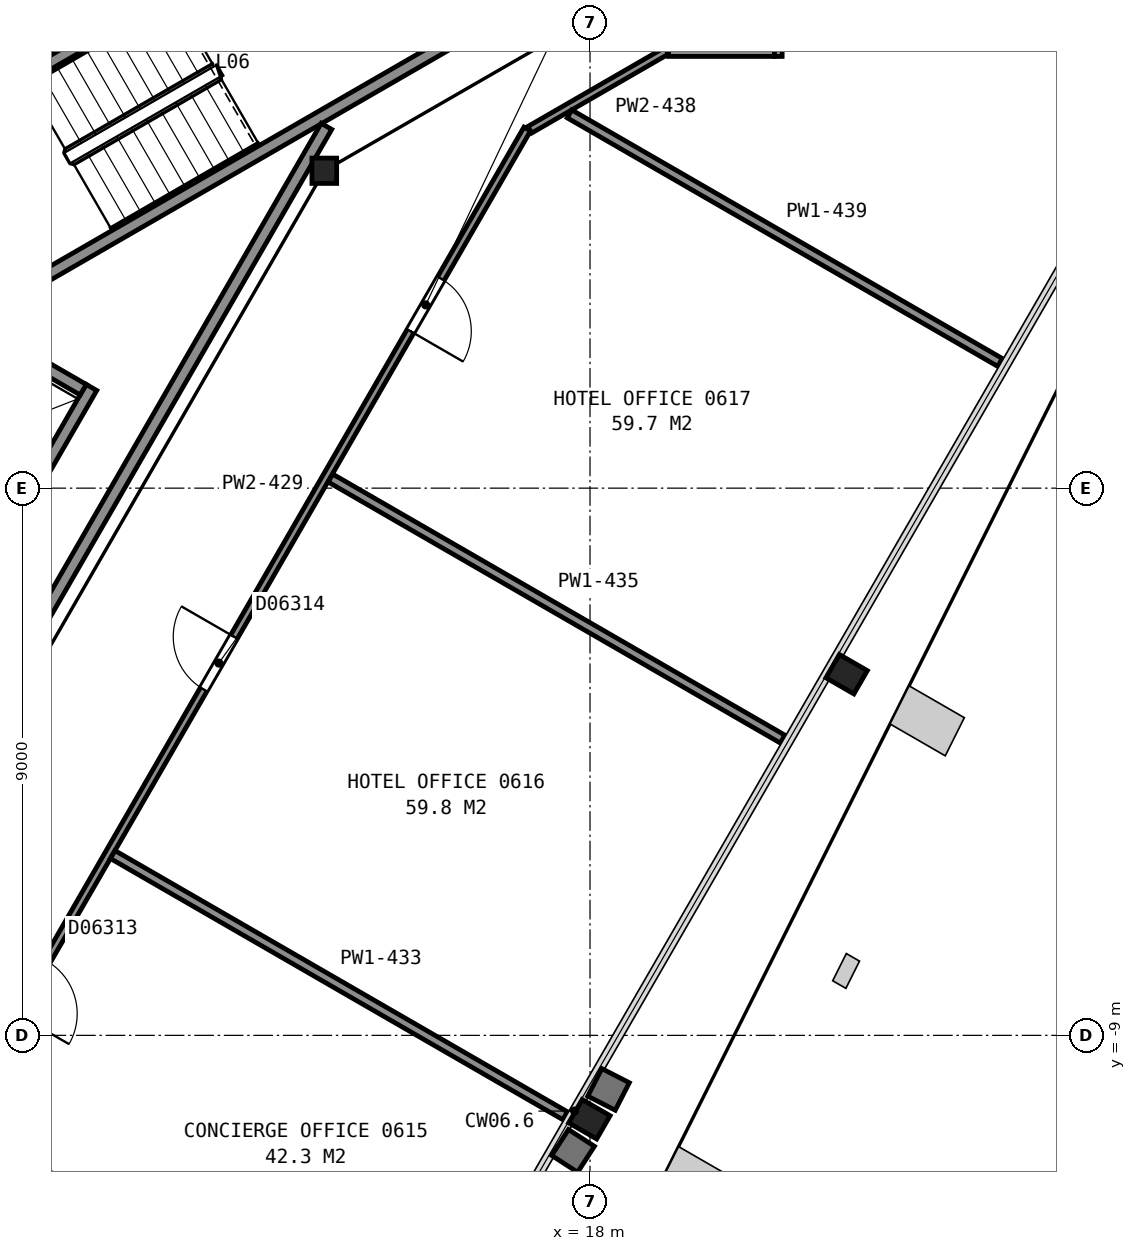
"""IFC4 building model, lengths in metres.
Left out: names, types, materials, properties, quantities, classifications, styles, units other than length and angle.
Written with IfcOpenShell. Run it as: python <this file> out.ifc"""

import sys

from ifc_helpers import new_model, si_unit, direction, frame, frame_2d, origin, origin_2d, place, context, subcontext, project, spatial, rectangle, i_section, extrude, element, fill, save


model = new_model("IFC4")
c1 = context("Model", 3, precision=1e-05, world=origin(), true_north=direction((0.0, 1.0)))
c2 = subcontext(c1, "Body", "Model", "MODEL_VIEW")
j1 = project(units=[si_unit("LENGTHUNIT", "METRE"), si_unit("PLANEANGLEUNIT", "RADIAN")], contexts=[c1])
p1 = place(None, origin())
s1 = spatial("IfcSite", under=j1, at=p1, CompositionType="ELEMENT")
p2 = place(p1, origin())
s2 = spatial("IfcBuilding", under=s1, at=p2, CompositionType="ELEMENT")
p3 = place(p2, frame((0.0, 0.0, 36.8)))
s3 = spatial("IfcBuildingStorey", under=s2, at=p3, CompositionType="ELEMENT", Elevation=36.8)
for number, where, z_axis, x_axis in (
    (1, (17.99, -10.38, 0.025), (0.0, 0.0, 1.0), (-0.5, -0.866, 0.0)),
    (2, (22.22, -3.06, 0.025), (0.0, 0.0, 1.0), (-0.5, -0.866, 0.0)),
):
    element("IfcColumn", number, at=place(p3, frame(where, z_axis=z_axis, x_axis=x_axis)), inside=s3, PredefinedType="COLUMN", context=c2, shape_type="SweptSolid", body=[
        extrude(i_section(OverallWidth=0.442, OverallDepth=0.531, WebThickness=0.066, FlangeThickness=0.106, FilletRadius=0.015, at=origin_2d()), origin(), (0.0, 0.0, 1.0), 3.575),
    ])
p4 = place(p3, frame((13.63, 5.22, 0.0), z_axis=(0.0, 0.0, 1.0), x_axis=(1.0, 0.0, 0.0)))
e3 = element("IfcColumn", 3, at=p4, inside=s3, PredefinedType="COLUMN", context=c2, shape_type="SweptSolid", body=[
    extrude(i_section(OverallWidth=0.406, OverallDepth=0.417, WebThickness=0.03, FlangeThickness=0.048, FilletRadius=0.015, at=origin_2d()), origin(), (0.0, 0.0, 1.0), 3.6),
])
for number, where, z_axis, x_axis in (
    (4, (6.178, 5.299, 0.0), (0.0, 0.0, 1.0), (0.866, 0.5, 0.0)),
    (5, (7.678, 2.701, 0.0), (0.0, 0.0, 1.0), (0.866, 0.5, 0.0)),
):
    element("IfcWall", number, at=place(p3, frame(where, z_axis=z_axis, x_axis=x_axis)), inside=s3, PredefinedType="PARTITIONING", context=c2, shape_type="SweptSolid", body=[
        extrude(rectangle(XDim=12.0, YDim=0.2, at=frame_2d((6.0, 0.0))), origin(), (0.0, 0.0, 1.0), 3.35),
    ])
p5 = place(p3, frame((7.451, -2.414, 0.0), z_axis=(0.0, 0.0, 1.0), x_axis=(0.500016218704, 0.866016039709, 0.0)))
e6 = element("IfcWall", 6, at=p5, inside=s3, PredefinedType="PARTITIONING", context=c2, shape_type="SweptSolid", body=[
    extrude(rectangle(XDim=4.7, YDim=0.2, at=frame_2d((2.35, 0.0))), origin(), (0.0, 0.0, 1.0), 3.6),
])
p6 = place(p3, frame((9.665, 1.62, 0.0), z_axis=(0.0, 0.0, 1.0), x_axis=(-0.866002029911, 0.500040482552, 0.0)))
e7 = element("IfcWall", 7, at=p6, inside=s3, PredefinedType="PARTITIONING", context=c2, shape_type="SweptSolid", body=[
    extrude(rectangle(XDim=1.75, YDim=0.2, at=frame_2d((0.875, 0.0))), origin(), (0.0, 0.0, 1.0), 3.6),
])
p7 = place(p3, frame((8.492, -3.012, 0.0), z_axis=(0.0, 0.0, 1.0), x_axis=(0.499972957231, 0.866041016371, 0.0)))
e8 = element("IfcWall", 8, at=p7, inside=s3, PredefinedType="PARTITIONING", context=c2, shape_type="SweptSolid", body=[
    extrude(rectangle(XDim=10.349, YDim=0.2, at=frame_2d((5.174, 0.0))), origin(), (0.0, 0.0, 1.0), 3.35),
])
p8 = place(p3, frame((16.967, 5.906, 0.0), z_axis=(0.0, 0.0, 1.0), x_axis=(-0.500024758804, -0.866011108811, 0.0)))
e9 = element("IfcWall", 9, at=p8, inside=s3, PredefinedType="PARTITIONING", context=c2, shape_type="SweptSolid", body=[
    extrude(rectangle(XDim=26.402, YDim=0.125, at=frame_2d((13.201, 0.0))), origin(), (0.0, 0.0, 1.0), 2.613),
])
p9 = place(p8, frame((21.332, 0.0, 0.0)))
e10 = element("IfcOpeningElement", 10, at=p9, cuts=e9, PredefinedType="OPENING", context=c2, shape_type="SweptSolid", body=[
    extrude(rectangle(XDim=1.2, YDim=2.1, at=frame_2d((0.6, 1.05))), frame((0.0, 0.073, 0.0), z_axis=(0.0, -1.0, 0.0), x_axis=(1.0, 0.0, 0.0)), (0.0, 0.0, 1.0), 0.145),
])
p10 = place(p8, frame((15.801, 0.0, 0.0)))
e11 = element("IfcOpeningElement", 11, at=p10, cuts=e9, PredefinedType="OPENING", context=c2, shape_type="SweptSolid", body=[
    extrude(rectangle(XDim=1.0, YDim=2.1, at=frame_2d((0.5, 1.05))), frame((0.0, 0.073, 0.0), z_axis=(0.0, -1.0, 0.0), x_axis=(1.0, 0.0, 0.0)), (0.0, 0.0, 1.0), 0.145),
])
p11 = place(p8, frame((9.642, 0.0, 0.0)))
e12 = element("IfcOpeningElement", 12, at=p11, cuts=e9, PredefinedType="OPENING", context=c2, shape_type="SweptSolid", body=[
    extrude(rectangle(XDim=1.0, YDim=2.1, at=frame_2d((0.5, 1.05))), frame((0.0, 0.073, 0.0), z_axis=(0.0, -1.0, 0.0), x_axis=(1.0, 0.0, 0.0)), (0.0, 0.0, 1.0), 0.145),
])
p12 = place(p8, frame((2.839, 0.0, 0.0)))
e13 = element("IfcOpeningElement", 13, at=p12, cuts=e9, PredefinedType="OPENING", context=c2, shape_type="SweptSolid", body=[
    extrude(rectangle(XDim=1.0, YDim=2.1, at=frame_2d((0.5, 1.05))), frame((0.0, 0.073, 0.0), z_axis=(0.0, -1.0, 0.0), x_axis=(1.0, 0.0, 0.0)), (0.0, 0.0, 1.0), 0.145),
])
p13 = place(p3, frame((7.599, -10.453, 0.0), z_axis=(0.0, 0.0, 1.0), x_axis=(0.865982457891, -0.500074377092, 0.0)))
e14 = element("IfcWall", 14, at=p13, inside=s3, PredefinedType="PARTITIONING", context=c2, shape_type="SweptSolid", body=[
    extrude(rectangle(XDim=8.587, YDim=0.15, at=frame_2d((4.293, 0.0))), origin(), (0.0, 0.0, 1.0), 2.613),
])
p14 = place(p3, frame((10.15, -6.026, 0.0), z_axis=(0.0, 0.0, 1.0), x_axis=(0.866041729639, -0.499971721724, 0.0)))
e15 = element("IfcWall", 15, at=p14, inside=s3, PredefinedType="PARTITIONING", context=c2, shape_type="SweptSolid", body=[
    extrude(rectangle(XDim=8.591, YDim=0.15, at=frame_2d((4.296, 0.0))), origin(), (0.0, 0.0, 1.0), 2.613),
])
p15 = place(p3, frame((13.73, 0.166, 0.0), z_axis=(0.0, 0.0, 1.0), x_axis=(0.866026501939, -0.499998097935, 0.0)))
e16 = element("IfcWall", 16, at=p15, inside=s3, PredefinedType="PARTITIONING", context=c2, shape_type="SweptSolid", body=[
    extrude(rectangle(XDim=8.587, YDim=0.15, at=frame_2d((4.293, 0.0))), origin(), (0.0, 0.0, 1.0), 2.613),
])
p16 = place(p3, frame((17.01, 5.895, 0.0), z_axis=(0.0, 0.0, 1.0), x_axis=(0.865944638795, 0.50013986298, 0.0)))
e17 = element("IfcWall", 17, at=p16, inside=s3, PredefinedType="PARTITIONING", context=c2, shape_type="SweptSolid", body=[
    extrude(rectangle(XDim=2.599, YDim=0.125, at=frame_2d((1.299, 0.0))), origin(), (0.0, 0.0, 1.0), 2.613),
])
p17 = place(p3, frame((17.662, 6.155, 0.0), z_axis=(0.0, 0.0, 1.0), x_axis=(0.866038908564, -0.499976608306, 0.0)))
e18 = element("IfcWall", 18, at=p17, inside=s3, PredefinedType="PARTITIONING", context=c2, shape_type="SweptSolid", body=[
    extrude(rectangle(XDim=8.177, YDim=0.15, at=frame_2d((4.088, 0.0))), origin(), (0.0, 0.0, 1.0), 2.613),
])
p18 = place(p3, frame((19.291, 7.163, 0.0), z_axis=(0.0, 0.0, 1.0), x_axis=(1.0, 0.0, 0.0)))
e19 = element("IfcWall", 19, at=p18, inside=s3, PredefinedType="PARTITIONING", context=c2, shape_type="SweptSolid", body=[
    extrude(rectangle(XDim=1.741, YDim=0.125, at=frame_2d((0.871, 0.0))), origin(), (0.0, 0.0, 1.0), 2.613),
])
p19 = place(p3, frame((21.097, 10.219, 0.0), z_axis=(0.0, 0.0, 1.0), x_axis=(0.0, -1.0, 0.0)))
e20 = element("IfcWall", 20, at=p19, inside=s3, PredefinedType="PARTITIONING", context=c2, shape_type="SweptSolid", body=[
    extrude(rectangle(XDim=3.119, YDim=0.125, at=frame_2d((1.56, 0.0))), origin(), (0.0, 0.0, 1.0), 2.613),
])
p20 = place(p19, frame((1.056, 0.0, 0.0)))
e21 = element("IfcOpeningElement", 21, at=p20, cuts=e20, PredefinedType="OPENING", context=c2, shape_type="SweptSolid", body=[
    extrude(rectangle(XDim=1.0, YDim=2.1, at=frame_2d((0.5, 1.05))), frame((0.0, 0.073, 0.0), z_axis=(0.0, -1.0, 0.0), x_axis=(1.0, 0.0, 0.0)), (0.0, 0.0, 1.0), 0.145),
])
p21 = place(p11, origin())
e22 = element("IfcDoor", 22, at=p21, inside=s3, OperationType="SINGLE_SWING_LEFT", PredefinedType="DOOR", context=c2, shape_type="SweptSolid", body=[
    extrude(rectangle(XDim=1.0, YDim=2.1, at=frame_2d((0.5, 1.05))), frame((0.0, 0.025, 0.0), z_axis=(0.0, -1.0, 0.0), x_axis=(1.0, 0.0, 0.0)), (0.0, 0.0, 1.0), 0.05),
])
fill(e12, e22)
p22 = place(p12, origin())
e23 = element("IfcDoor", 23, at=p22, inside=s3, OperationType="SINGLE_SWING_RIGHT", PredefinedType="DOOR", context=c2, shape_type="SweptSolid", body=[
    extrude(rectangle(XDim=1.0, YDim=2.1, at=frame_2d((0.5, 1.05))), frame((0.0, 0.025, 0.0), z_axis=(0.0, -1.0, 0.0), x_axis=(1.0, 0.0, 0.0)), (0.0, 0.0, 1.0), 0.05),
])
fill(e13, e23)
save(model, sys.argv[1])
